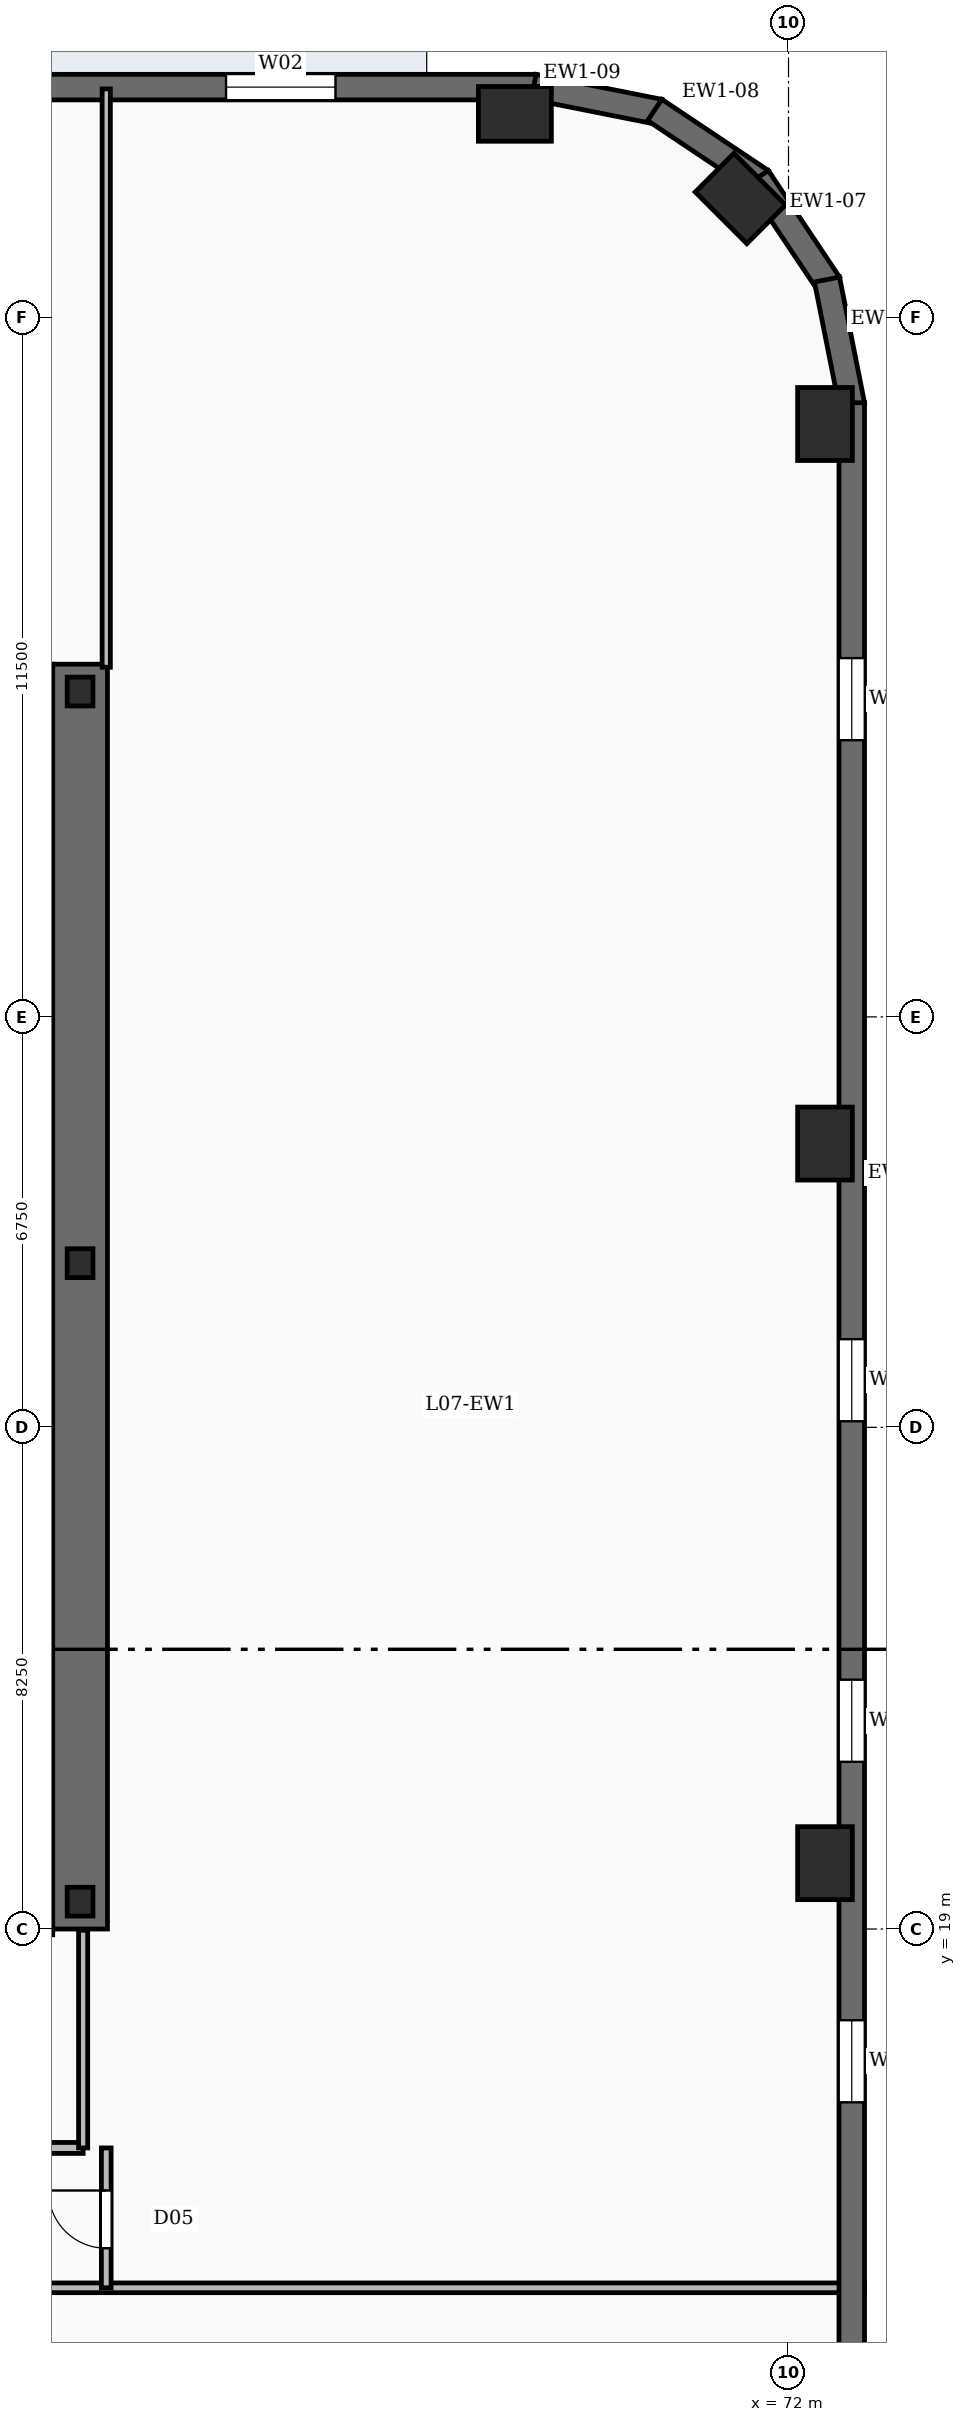
"""IFC4 building model, lengths in metres.
Left out: names, types, materials, properties, quantities, classifications, styles, units other than length and angle.
Written with IfcOpenShell. Run it as: python <this file> out.ifc"""

import sys

from ifc_helpers import new_model, si_unit, direction, frame, frame_2d, origin, origin_2d, place, context, subcontext, project, spatial, rectangle, i_section, extrude, element, fill, save


model = new_model("IFC4")
c1 = context("Model", 3, precision=1e-05, world=origin(), true_north=direction((0.0, 1.0)))
c2 = subcontext(c1, "Body", "Model", "MODEL_VIEW")
j1 = project(units=[si_unit("LENGTHUNIT", "METRE"), si_unit("PLANEANGLEUNIT", "RADIAN")], contexts=[c1])
p1 = place(None, origin())
s1 = spatial("IfcSite", under=j1, at=p1, CompositionType="ELEMENT")
p2 = place(p1, origin())
s2 = spatial("IfcBuilding", under=s1, at=p2, CompositionType="ELEMENT")
p3 = place(p2, frame((0.0, 0.0, 42.0)))
s3 = spatial("IfcBuildingStorey", under=s2, at=p3, CompositionType="ELEMENT", Elevation=42.0)
p4 = place(p3, frame((60.35, 19.0, -0.45), z_axis=(0.0, 0.0, 1.0), x_axis=(0.0, 1.0, 0.0)))
e1 = element("IfcWall", 1, at=p4, inside=s3, PredefinedType="SHEAR", context=c2, shape_type="SweptSolid", body=[
    extrude(rectangle(XDim=20.8, YDim=0.9, at=frame_2d((10.4, 0.0))), origin(), (0.0, 0.0, 1.0), 3.93),
])
for number, where, z_axis, x_axis in (
    (2, (60.35, 19.45, -0.45), (0.0, 0.0, 1.0), (1.0, 0.0, 0.0)),
    (3, (60.35, 29.95, -0.45), (0.0, 0.0, 1.0), (1.0, 0.0, 0.0)),
    (4, (60.35, 39.35, -0.45), (0.0, 0.0, 1.0), (1.0, 0.0, 0.0)),
):
    element("IfcColumn", number, at=place(p3, frame(where, z_axis=z_axis, x_axis=x_axis)), inside=s3, PredefinedType="COLUMN", context=c2, shape_type="SweptSolid", body=[
        extrude(i_section(OverallWidth=0.424, OverallDepth=0.474, WebThickness=0.048, FlangeThickness=0.077, FilletRadius=0.02, at=origin_2d()), origin(), (0.0, 0.0, 1.0), 3.93),
    ])
for number, where, z_axis, x_axis in (
    (5, (72.6, 20.083, -0.45), (0.0, 0.0, 1.0), (0.0, 1.0, 0.0)),
    (6, (72.6, 31.917, -0.45), (0.0, 0.0, 1.0), (0.0, 1.0, 0.0)),
    (7, (72.6, 43.75, -0.45), (0.0, 0.0, 1.0), (0.0, 1.0, 0.0)),
    (8, (71.209, 47.459, -0.45), (0.0, 0.0, 1.0), (-0.707, 0.707, 0.0)),
    (9, (67.5, 48.85, -0.45), (0.0, 0.0, 1.0), (1.0, 0.0, 0.0)),
):
    element("IfcColumn", number, at=place(p3, frame(where, z_axis=z_axis, x_axis=x_axis)), inside=s3, PredefinedType="COLUMN", context=c2, shape_type="SweptSolid", body=[
        extrude(rectangle(XDim=1.2, YDim=0.9, at=origin_2d()), origin(), (0.0, 0.0, 1.0), 3.93),
    ])
p5 = place(p3, frame((73.04, 44.1, 0.0), z_axis=(0.0, 0.0, 1.0), x_axis=(0.0, -1.0, 0.0)))
e10 = element("IfcWall", 10, at=p5, inside=s3, PredefinedType="SOLIDWALL", context=c2, shape_type="SweptSolid", body=[
    extrude(rectangle(XDim=36.2, YDim=0.42, at=frame_2d((18.1, 0.0))), origin(), (0.0, 0.0, 1.0), 3.48),
])
p6 = place(p5, frame((4.2, 0.0, 0.88)))
e11 = element("IfcOpeningElement", 11, at=p6, cuts=e10, PredefinedType="OPENING", context=c2, shape_type="SweptSolid", body=[
    extrude(rectangle(XDim=1.35, YDim=2.2, at=frame_2d((0.675, 1.1))), frame((0.0, 0.22, 0.0), z_axis=(0.0, -1.0, 0.0), x_axis=(1.0, 0.0, 0.0)), (0.0, 0.0, 1.0), 0.44),
])
p7 = place(p5, frame((15.4, 0.0, 0.88)))
e12 = element("IfcOpeningElement", 12, at=p7, cuts=e10, PredefinedType="OPENING", context=c2, shape_type="SweptSolid", body=[
    extrude(rectangle(XDim=1.35, YDim=2.2, at=frame_2d((0.675, 1.1))), frame((0.0, 0.22, 0.0), z_axis=(0.0, -1.0, 0.0), x_axis=(1.0, 0.0, 0.0)), (0.0, 0.0, 1.0), 0.44),
])
p8 = place(p5, frame((21.0, 0.0, 0.88)))
e13 = element("IfcOpeningElement", 13, at=p8, cuts=e10, PredefinedType="OPENING", context=c2, shape_type="SweptSolid", body=[
    extrude(rectangle(XDim=1.35, YDim=2.2, at=frame_2d((0.675, 1.1))), frame((0.0, 0.22, 0.0), z_axis=(0.0, -1.0, 0.0), x_axis=(1.0, 0.0, 0.0)), (0.0, 0.0, 1.0), 0.44),
])
p9 = place(p5, frame((26.6, 0.0, 0.88)))
e14 = element("IfcOpeningElement", 14, at=p9, cuts=e10, PredefinedType="OPENING", context=c2, shape_type="SweptSolid", body=[
    extrude(rectangle(XDim=1.35, YDim=2.2, at=frame_2d((0.675, 1.1))), frame((0.0, 0.22, 0.0), z_axis=(0.0, -1.0, 0.0), x_axis=(1.0, 0.0, 0.0)), (0.0, 0.0, 1.0), 0.44),
])
for number, where, z_axis, x_axis in (
    (15, (72.633, 46.125, 0.0), (0.0, 0.0, 1.0), (0.195, -0.981, 0.0)),
    (16, (71.494, 47.802, 0.0), (0.0, 0.0, 1.0), (0.556, -0.832, 0.0)),
    (17, (69.8, 48.914, 0.0), (0.0, 0.0, 1.0), (0.832, -0.556, 0.0)),
    (18, (67.809, 49.294, 0.0), (0.0, 0.0, 1.0), (0.981, -0.195, 0.0)),
):
    element("IfcWall", number, at=place(p3, frame(where, z_axis=z_axis, x_axis=x_axis)), inside=s3, PredefinedType="SOLIDWALL", context=c2, shape_type="SweptSolid", body=[
        extrude(rectangle(XDim=2.107, YDim=0.42, at=frame_2d((1.053, 0.0))), origin(), (0.0, 0.0, 1.0), 3.48),
    ])
p10 = place(p3, frame((6.15, 49.29, 0.0), z_axis=(0.0, 0.0, 1.0), x_axis=(1.0, 0.0, 0.0)))
e19 = element("IfcWall", 19, at=p10, inside=s3, PredefinedType="SOLIDWALL", context=c2, shape_type="SweptSolid", body=[
    extrude(rectangle(XDim=61.7, YDim=0.42, at=frame_2d((30.85, 0.0))), origin(), (0.0, 0.0, 1.0), 3.48),
])
p11 = place(p10, frame((2.6, 0.0, 0.88)))
e20 = element("IfcOpeningElement", 20, at=p11, cuts=e19, PredefinedType="OPENING", context=c2, shape_type="SweptSolid", body=[
    extrude(rectangle(XDim=1.8, YDim=2.15, at=frame_2d((0.9, 1.075))), frame((0.0, 0.22, 0.0), z_axis=(0.0, -1.0, 0.0), x_axis=(1.0, 0.0, 0.0)), (0.0, 0.0, 1.0), 0.44),
])
p12 = place(p10, frame((18.8, 0.0, 0.88)))
e21 = element("IfcOpeningElement", 21, at=p12, cuts=e19, PredefinedType="OPENING", context=c2, shape_type="SweptSolid", body=[
    extrude(rectangle(XDim=1.8, YDim=2.15, at=frame_2d((0.9, 1.075))), frame((0.0, 0.22, 0.0), z_axis=(0.0, -1.0, 0.0), x_axis=(1.0, 0.0, 0.0)), (0.0, 0.0, 1.0), 0.44),
])
p13 = place(p10, frame((35.0, 0.0, 0.88)))
e22 = element("IfcOpeningElement", 22, at=p13, cuts=e19, PredefinedType="OPENING", context=c2, shape_type="SweptSolid", body=[
    extrude(rectangle(XDim=1.8, YDim=2.15, at=frame_2d((0.9, 1.075))), frame((0.0, 0.22, 0.0), z_axis=(0.0, -1.0, 0.0), x_axis=(1.0, 0.0, 0.0)), (0.0, 0.0, 1.0), 0.44),
])
p14 = place(p10, frame((40.4, 0.0, 0.88)))
e23 = element("IfcOpeningElement", 23, at=p14, cuts=e19, PredefinedType="OPENING", context=c2, shape_type="SweptSolid", body=[
    extrude(rectangle(XDim=1.8, YDim=2.15, at=frame_2d((0.9, 1.075))), frame((0.0, 0.22, 0.0), z_axis=(0.0, -1.0, 0.0), x_axis=(1.0, 0.0, 0.0)), (0.0, 0.0, 1.0), 0.44),
])
p15 = place(p10, frame((51.2, 0.0, 0.88)))
e24 = element("IfcOpeningElement", 24, at=p15, cuts=e19, PredefinedType="OPENING", context=c2, shape_type="SweptSolid", body=[
    extrude(rectangle(XDim=1.8, YDim=2.15, at=frame_2d((0.9, 1.075))), frame((0.0, 0.22, 0.0), z_axis=(0.0, -1.0, 0.0), x_axis=(1.0, 0.0, 0.0)), (0.0, 0.0, 1.0), 0.44),
])
p16 = place(p10, frame((56.6, 0.0, 0.88)))
e25 = element("IfcOpeningElement", 25, at=p16, cuts=e19, PredefinedType="OPENING", context=c2, shape_type="SweptSolid", body=[
    extrude(rectangle(XDim=1.8, YDim=2.15, at=frame_2d((0.9, 1.075))), frame((0.0, 0.22, 0.0), z_axis=(0.0, -1.0, 0.0), x_axis=(1.0, 0.0, 0.0)), (0.0, 0.0, 1.0), 0.44),
])
p17 = place(p3, frame((59.78, 30.15, 0.0), z_axis=(0.0, 0.0, 1.0), x_axis=(0.0, 1.0, 0.0)))
e26 = element("IfcWall", 26, at=p17, inside=s3, PredefinedType="SOLIDWALL", context=c2, shape_type="SweptSolid", body=[
    extrude(rectangle(XDim=3.23, YDim=0.24, at=frame_2d((1.615, 0.0))), origin(), (0.0, 0.0, 1.0), 3.48),
])
p18 = place(p3, frame((59.78, 34.95, 0.0), z_axis=(0.0, 0.0, 1.0), x_axis=(0.0, 1.0, 0.0)))
e27 = element("IfcWall", 27, at=p18, inside=s3, PredefinedType="SOLIDWALL", context=c2, shape_type="SweptSolid", body=[
    extrude(rectangle(XDim=3.15, YDim=0.24, at=frame_2d((1.575, 0.0))), origin(), (0.0, 0.0, 1.0), 3.48),
])
p19 = place(p3, frame((50.4, 15.4, 0.0), z_axis=(0.0, 0.0, 1.0), x_axis=(1.0, 0.0, 0.0)))
e28 = element("IfcWall", 28, at=p19, inside=s3, PredefinedType="SOLIDWALL", context=c2, shape_type="SweptSolid", body=[
    extrude(rectangle(XDim=10.0, YDim=0.18, at=frame_2d((5.0, 0.0))), origin(), (0.0, 0.0, 1.0), 2.54),
])
p20 = place(p19, frame((1.19, 0.0, 0.0)))
e29 = element("IfcOpeningElement", 29, at=p20, cuts=e28, PredefinedType="OPENING", context=c2, shape_type="SweptSolid", body=[
    extrude(rectangle(XDim=0.92, YDim=2.1, at=frame_2d((0.46, 1.05))), frame((0.0, 0.1, 0.0), z_axis=(0.0, -1.0, 0.0), x_axis=(1.0, 0.0, 0.0)), (0.0, 0.0, 1.0), 0.2),
])
p21 = place(p19, frame((4.54, 0.0, 0.0)))
e30 = element("IfcOpeningElement", 30, at=p21, cuts=e28, PredefinedType="OPENING", context=c2, shape_type="SweptSolid", body=[
    extrude(rectangle(XDim=0.92, YDim=2.1, at=frame_2d((0.46, 1.05))), frame((0.0, 0.1, 0.0), z_axis=(0.0, -1.0, 0.0), x_axis=(1.0, 0.0, 0.0)), (0.0, 0.0, 1.0), 0.2),
])
p22 = place(p19, frame((7.92, 0.0, 0.0)))
e31 = element("IfcOpeningElement", 31, at=p22, cuts=e28, PredefinedType="OPENING", context=c2, shape_type="SweptSolid", body=[
    extrude(rectangle(XDim=0.86, YDim=2.05, at=frame_2d((0.43, 1.025))), frame((0.0, 0.1, 0.0), z_axis=(0.0, -1.0, 0.0), x_axis=(1.0, 0.0, 0.0)), (0.0, 0.0, 1.0), 0.2),
])
p23 = place(p3, frame((60.4, 15.4, 0.0), z_axis=(0.0, 0.0, 1.0), x_axis=(0.0, 1.0, 0.0)))
e32 = element("IfcWall", 32, at=p23, inside=s3, PredefinedType="PARTITIONING", context=c2, shape_type="SweptSolid", body=[
    extrude(rectangle(XDim=3.58, YDim=0.15, at=frame_2d((1.79, 0.0))), origin(), (0.0, 0.0, 1.0), 2.54),
])
p24 = place(p3, frame((0.75, 13.1, 0.0), z_axis=(0.0, 0.0, 1.0), x_axis=(1.0, 0.0, 0.0)))
e33 = element("IfcWall", 33, at=p24, inside=s3, PredefinedType="PARTITIONING", context=c2, shape_type="SweptSolid", body=[
    extrude(rectangle(XDim=72.5, YDim=0.16, at=frame_2d((36.25, 0.0))), origin(), (0.0, 0.0, 1.0), 2.54),
])
p25 = place(p24, frame((21.275, 0.0, 0.0)))
e34 = element("IfcOpeningElement", 34, at=p25, cuts=e33, PredefinedType="OPENING", context=c2, shape_type="SweptSolid", body=[
    extrude(rectangle(XDim=0.95, YDim=2.15, at=frame_2d((0.475, 1.075))), frame((0.0, 0.09, 0.0), z_axis=(0.0, -1.0, 0.0), x_axis=(1.0, 0.0, 0.0)), (0.0, 0.0, 1.0), 0.18),
])
p26 = place(p24, frame((36.275, 0.0, 0.0)))
e35 = element("IfcOpeningElement", 35, at=p26, cuts=e33, PredefinedType="OPENING", context=c2, shape_type="SweptSolid", body=[
    extrude(rectangle(XDim=0.95, YDim=2.15, at=frame_2d((0.475, 1.075))), frame((0.0, 0.09, 0.0), z_axis=(0.0, -1.0, 0.0), x_axis=(1.0, 0.0, 0.0)), (0.0, 0.0, 1.0), 0.18),
])
p27 = place(p24, frame((47.475, 0.0, 0.0)))
e36 = element("IfcOpeningElement", 36, at=p27, cuts=e33, PredefinedType="OPENING", context=c2, shape_type="SweptSolid", body=[
    extrude(rectangle(XDim=0.95, YDim=2.15, at=frame_2d((0.475, 1.075))), frame((0.0, 0.09, 0.0), z_axis=(0.0, -1.0, 0.0), x_axis=(1.0, 0.0, 0.0)), (0.0, 0.0, 1.0), 0.18),
])
p28 = place(p3, frame((60.78, 39.75, 0.0), z_axis=(0.0, 0.0, 1.0), x_axis=(0.0, 1.0, 0.0)))
e37 = element("IfcWall", 37, at=p28, inside=s3, PredefinedType="PARTITIONING", context=c2, shape_type="SweptSolid", body=[
    extrude(rectangle(XDim=9.51, YDim=0.135, at=frame_2d((4.755, 0.0))), origin(), (0.0, 0.0, 1.0), 2.54),
])
p29 = place(p3, frame((60.78, 13.1, 0.0), z_axis=(0.0, 0.0, 1.0), x_axis=(0.0, 1.0, 0.0)))
e38 = element("IfcWall", 38, at=p29, inside=s3, PredefinedType="PARTITIONING", context=c2, shape_type="SweptSolid", body=[
    extrude(rectangle(XDim=2.3, YDim=0.16, at=frame_2d((1.15, 0.0))), origin(), (0.0, 0.0, 1.0), 2.54),
])
p30 = place(p29, frame((0.65, 0.0, 0.0)))
e39 = element("IfcOpeningElement", 39, at=p30, cuts=e38, PredefinedType="OPENING", context=c2, shape_type="SweptSolid", body=[
    extrude(rectangle(XDim=0.95, YDim=2.15, at=frame_2d((0.475, 1.075))), frame((0.0, 0.09, 0.0), z_axis=(0.0, -1.0, 0.0), x_axis=(1.0, 0.0, 0.0)), (0.0, 0.0, 1.0), 0.18),
])
p31 = place(p6, origin())
e40 = element("IfcWindow", 40, at=p31, inside=s3, PartitioningType="SINGLE_PANEL", PredefinedType="WINDOW", context=c2, shape_type="SweptSolid", body=[
    extrude(rectangle(XDim=1.35, YDim=2.2, at=frame_2d((0.675, 1.1))), frame((0.0, 0.03, 0.0), z_axis=(0.0, -1.0, 0.0), x_axis=(1.0, 0.0, 0.0)), (0.0, 0.0, 1.0), 0.06),
])
fill(e11, e40)
p32 = place(p7, origin())
e41 = element("IfcWindow", 41, at=p32, inside=s3, PartitioningType="SINGLE_PANEL", PredefinedType="WINDOW", context=c2, shape_type="SweptSolid", body=[
    extrude(rectangle(XDim=1.35, YDim=2.2, at=frame_2d((0.675, 1.1))), frame((0.0, 0.03, 0.0), z_axis=(0.0, -1.0, 0.0), x_axis=(1.0, 0.0, 0.0)), (0.0, 0.0, 1.0), 0.06),
])
fill(e12, e41)
p33 = place(p8, origin())
e42 = element("IfcWindow", 42, at=p33, inside=s3, PartitioningType="SINGLE_PANEL", PredefinedType="WINDOW", context=c2, shape_type="SweptSolid", body=[
    extrude(rectangle(XDim=1.35, YDim=2.2, at=frame_2d((0.675, 1.1))), frame((0.0, 0.03, 0.0), z_axis=(0.0, -1.0, 0.0), x_axis=(1.0, 0.0, 0.0)), (0.0, 0.0, 1.0), 0.06),
])
fill(e13, e42)
p34 = place(p9, origin())
e43 = element("IfcWindow", 43, at=p34, inside=s3, PartitioningType="SINGLE_PANEL", PredefinedType="WINDOW", context=c2, shape_type="SweptSolid", body=[
    extrude(rectangle(XDim=1.35, YDim=2.2, at=frame_2d((0.675, 1.1))), frame((0.0, 0.03, 0.0), z_axis=(0.0, -1.0, 0.0), x_axis=(1.0, 0.0, 0.0)), (0.0, 0.0, 1.0), 0.06),
])
fill(e14, e43)
p35 = place(p16, origin())
e44 = element("IfcWindow", 44, at=p35, inside=s3, PartitioningType="DOUBLE_PANEL_VERTICAL", PredefinedType="WINDOW", context=c2, shape_type="SweptSolid", body=[
    extrude(rectangle(XDim=1.8, YDim=2.15, at=frame_2d((0.9, 1.075))), frame((0.0, 0.03, 0.0), z_axis=(0.0, -1.0, 0.0), x_axis=(1.0, 0.0, 0.0)), (0.0, 0.0, 1.0), 0.06),
])
fill(e25, e44)
p36 = place(p30, origin())
e45 = element("IfcDoor", 45, at=p36, inside=s3, OperationType="SINGLE_SWING_RIGHT", PredefinedType="DOOR", context=c2, shape_type="SweptSolid", body=[
    extrude(rectangle(XDim=0.95, YDim=2.15, at=frame_2d((0.475, 1.075))), frame((0.0, 0.025, 0.0), z_axis=(0.0, -1.0, 0.0), x_axis=(1.0, 0.0, 0.0)), (0.0, 0.0, 1.0), 0.05),
])
fill(e39, e45)
save(model, sys.argv[1])
